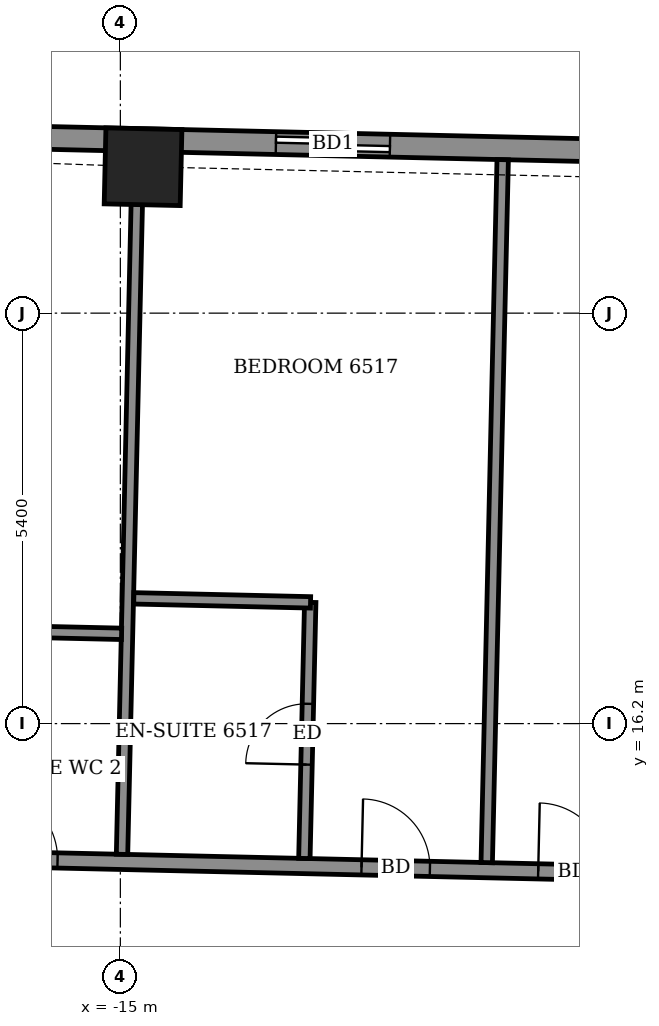
"""IFC4 building model, lengths in metres.
Left out: names, types, materials, properties, quantities, classifications, styles, units other than length and angle.
Written with IfcOpenShell. Run it as: python <this file> out.ifc"""

import sys

from ifc_helpers import new_model, si_unit, direction, frame, frame_2d, origin, origin_2d, place, context, subcontext, project, spatial, rectangle, extrude, element, fill, save


model = new_model("IFC4")
c1 = context("Model", 3, precision=1e-05, world=origin(), true_north=direction((0.0, 1.0)))
c2 = subcontext(c1, "Body", "Model", "MODEL_VIEW")
j1 = project(units=[si_unit("LENGTHUNIT", "METRE"), si_unit("PLANEANGLEUNIT", "RADIAN")], contexts=[c1])
p1 = place(None, origin())
s1 = spatial("IfcSite", under=j1, at=p1, CompositionType="ELEMENT")
p2 = place(p1, origin())
s2 = spatial("IfcBuilding", under=s1, at=p2, CompositionType="ELEMENT")
p3 = place(p2, frame((0.0, 0.0, 257.3)))
s3 = spatial("IfcBuildingStorey", under=s2, at=p3, CompositionType="ELEMENT", Elevation=257.3)
p4 = place(p3, frame((-14.701, 23.526, -0.55), z_axis=(0.0, 0.0, 1.0), x_axis=(-0.999741948423, 0.022716438162, 0.0)))
e1 = element("IfcColumn", 1, at=p4, inside=s3, PredefinedType="COLUMN", context=c2, shape_type="SweptSolid", body=[
    extrude(rectangle(XDim=1.0, YDim=1.0, at=origin_2d()), origin(), (0.0, 0.0, 1.0), 3.6),
])
p5 = place(p3, frame((26.35, 22.945, 0.0), z_axis=(0.0, 0.0, 1.0), x_axis=(-0.999742523712, 0.022691105788, 0.0)))
e2 = element("IfcWall", 2, at=p5, inside=s3, PredefinedType="SOLIDWALL", context=c2, shape_type="SweptSolid", body=[
    extrude(rectangle(XDim=47.771, YDim=0.3, at=frame_2d((23.886, 0.0))), origin(), (0.0, 0.0, 1.0), 2.55),
])
p6 = place(p5, frame((1.578, 0.0, 0.0)))
e3 = element("IfcOpeningElement", 3, at=p6, cuts=e2, PredefinedType="OPENING", context=c2, shape_type="SweptSolid", body=[
    extrude(rectangle(XDim=1.5, YDim=2.4, at=frame_2d((0.75, 1.2))), frame((0.0, 0.16, 0.0), z_axis=(0.0, -1.0, 0.0), x_axis=(1.0, 0.0, 0.0)), (0.0, 0.0, 1.0), 0.32),
])
p7 = place(p5, frame((4.545, 0.0, 0.0)))
e4 = element("IfcOpeningElement", 4, at=p7, cuts=e2, PredefinedType="OPENING", context=c2, shape_type="SweptSolid", body=[
    extrude(rectangle(XDim=1.5, YDim=2.4, at=frame_2d((0.75, 1.2))), frame((0.0, 0.16, 0.0), z_axis=(0.0, -1.0, 0.0), x_axis=(1.0, 0.0, 0.0)), (0.0, 0.0, 1.0), 0.32),
])
p8 = place(p5, frame((10.354, 0.0, 0.0)))
e5 = element("IfcOpeningElement", 5, at=p8, cuts=e2, PredefinedType="OPENING", context=c2, shape_type="SweptSolid", body=[
    extrude(rectangle(XDim=1.5, YDim=2.4, at=frame_2d((0.75, 1.2))), frame((0.0, 0.16, 0.0), z_axis=(0.0, -1.0, 0.0), x_axis=(1.0, 0.0, 0.0)), (0.0, 0.0, 1.0), 0.32),
])
p9 = place(p5, frame((15.204, 0.0, 0.0)))
e6 = element("IfcOpeningElement", 6, at=p9, cuts=e2, PredefinedType="OPENING", context=c2, shape_type="SweptSolid", body=[
    extrude(rectangle(XDim=1.5, YDim=2.4, at=frame_2d((0.75, 1.2))), frame((0.0, 0.16, 0.0), z_axis=(0.0, -1.0, 0.0), x_axis=(1.0, 0.0, 0.0)), (0.0, 0.0, 1.0), 0.32),
])
p10 = place(p5, frame((18.537, 0.0, 0.0)))
e7 = element("IfcOpeningElement", 7, at=p10, cuts=e2, PredefinedType="OPENING", context=c2, shape_type="SweptSolid", body=[
    extrude(rectangle(XDim=1.2, YDim=2.4, at=frame_2d((0.6, 1.2))), frame((0.0, 0.16, 0.0), z_axis=(0.0, -1.0, 0.0), x_axis=(1.0, 0.0, 0.0)), (0.0, 0.0, 1.0), 0.32),
])
p11 = place(p5, frame((24.171, 0.0, 0.0)))
e8 = element("IfcOpeningElement", 8, at=p11, cuts=e2, PredefinedType="OPENING", context=c2, shape_type="SweptSolid", body=[
    extrude(rectangle(XDim=1.5, YDim=2.4, at=frame_2d((0.75, 1.2))), frame((0.0, 0.16, 0.0), z_axis=(0.0, -1.0, 0.0), x_axis=(1.0, 0.0, 0.0)), (0.0, 0.0, 1.0), 0.32),
])
p12 = place(p5, frame((28.871, 0.0, 0.0)))
e9 = element("IfcOpeningElement", 9, at=p12, cuts=e2, PredefinedType="OPENING", context=c2, shape_type="SweptSolid", body=[
    extrude(rectangle(XDim=1.5, YDim=2.4, at=frame_2d((0.75, 1.2))), frame((0.0, 0.16, 0.0), z_axis=(0.0, -1.0, 0.0), x_axis=(1.0, 0.0, 0.0)), (0.0, 0.0, 1.0), 0.32),
])
p13 = place(p5, frame((32.055, 0.0, 0.0)))
e10 = element("IfcOpeningElement", 10, at=p13, cuts=e2, PredefinedType="OPENING", context=c2, shape_type="SweptSolid", body=[
    extrude(rectangle(XDim=1.5, YDim=2.4, at=frame_2d((0.75, 1.2))), frame((0.0, 0.16, 0.0), z_axis=(0.0, -1.0, 0.0), x_axis=(1.0, 0.0, 0.0)), (0.0, 0.0, 1.0), 0.32),
])
p14 = place(p5, frame((37.813, 0.0, 0.0)))
e11 = element("IfcOpeningElement", 11, at=p14, cuts=e2, PredefinedType="OPENING", context=c2, shape_type="SweptSolid", body=[
    extrude(rectangle(XDim=1.5, YDim=2.4, at=frame_2d((0.75, 1.2))), frame((0.0, 0.16, 0.0), z_axis=(0.0, -1.0, 0.0), x_axis=(1.0, 0.0, 0.0)), (0.0, 0.0, 1.0), 0.32),
])
p15 = place(p5, frame((43.052, 0.0, 0.9)))
e12 = element("IfcOpeningElement", 12, at=p15, cuts=e2, PredefinedType="OPENING", context=c2, shape_type="SweptSolid", body=[
    extrude(rectangle(XDim=2.4, YDim=1.5, at=frame_2d((1.2, 0.75))), frame((0.0, 0.16, 0.0), z_axis=(0.0, -1.0, 0.0), x_axis=(1.0, 0.0, 0.0)), (0.0, 0.0, 1.0), 0.32),
])
p16 = place(p3, frame((-24.474, 14.596, 0.0), z_axis=(0.0, 0.0, 1.0), x_axis=(0.999742424031, -0.022695497208, 0.0)))
e13 = element("IfcWall", 13, at=p16, inside=s3, PredefinedType="PARTITIONING", context=c2, shape_type="SweptSolid", body=[
    extrude(rectangle(XDim=52.872, YDim=0.2, at=frame_2d((26.436, 0.0))), origin(), (0.0, 0.0, 1.0), 3.05),
])
p17 = place(p16, frame((51.336, 0.0, 0.0)))
e14 = element("IfcOpeningElement", 14, at=p17, cuts=e13, PredefinedType="OPENING", context=c2, shape_type="SweptSolid", body=[
    extrude(rectangle(XDim=1.0, YDim=2.1, at=frame_2d((0.5, 1.05))), frame((0.0, 0.11, 0.0), z_axis=(0.0, -1.0, 0.0), x_axis=(1.0, 0.0, 0.0)), (0.0, 0.0, 1.0), 0.22),
])
p18 = place(p16, frame((47.25, 0.0, 0.0)))
e15 = element("IfcOpeningElement", 15, at=p18, cuts=e13, PredefinedType="OPENING", context=c2, shape_type="SweptSolid", body=[
    extrude(rectangle(XDim=0.9, YDim=2.1, at=frame_2d((0.45, 1.05))), frame((0.0, 0.11, 0.0), z_axis=(0.0, -1.0, 0.0), x_axis=(1.0, 0.0, 0.0)), (0.0, 0.0, 1.0), 0.22),
])
p19 = place(p16, frame((42.475, 0.0, 0.0)))
e16 = element("IfcOpeningElement", 16, at=p19, cuts=e13, PredefinedType="OPENING", context=c2, shape_type="SweptSolid", body=[
    extrude(rectangle(XDim=0.9, YDim=2.1, at=frame_2d((0.45, 1.05))), frame((0.0, 0.11, 0.0), z_axis=(0.0, -1.0, 0.0), x_axis=(1.0, 0.0, 0.0)), (0.0, 0.0, 1.0), 0.22),
])
p20 = place(p16, frame((40.15, 0.0, 0.0)))
e17 = element("IfcOpeningElement", 17, at=p20, cuts=e13, PredefinedType="OPENING", context=c2, shape_type="SweptSolid", body=[
    extrude(rectangle(XDim=0.9, YDim=2.1, at=frame_2d((0.45, 1.05))), frame((0.0, 0.11, 0.0), z_axis=(0.0, -1.0, 0.0), x_axis=(1.0, 0.0, 0.0)), (0.0, 0.0, 1.0), 0.22),
])
p21 = place(p16, frame((33.15, 0.0, 0.0)))
e18 = element("IfcOpeningElement", 18, at=p21, cuts=e13, PredefinedType="OPENING", context=c2, shape_type="SweptSolid", body=[
    extrude(rectangle(XDim=0.9, YDim=2.1, at=frame_2d((0.45, 1.05))), frame((0.0, 0.11, 0.0), z_axis=(0.0, -1.0, 0.0), x_axis=(1.0, 0.0, 0.0)), (0.0, 0.0, 1.0), 0.22),
])
p22 = place(p16, frame((30.95, 0.0, 0.0)))
e19 = element("IfcOpeningElement", 19, at=p22, cuts=e13, PredefinedType="OPENING", context=c2, shape_type="SweptSolid", body=[
    extrude(rectangle(XDim=0.9, YDim=2.1, at=frame_2d((0.45, 1.05))), frame((0.0, 0.11, 0.0), z_axis=(0.0, -1.0, 0.0), x_axis=(1.0, 0.0, 0.0)), (0.0, 0.0, 1.0), 0.22),
])
p23 = place(p16, frame((23.975, 0.0, 0.0)))
e20 = element("IfcOpeningElement", 20, at=p23, cuts=e13, PredefinedType="OPENING", context=c2, shape_type="SweptSolid", body=[
    extrude(rectangle(XDim=0.9, YDim=2.1, at=frame_2d((0.45, 1.05))), frame((0.0, 0.11, 0.0), z_axis=(0.0, -1.0, 0.0), x_axis=(1.0, 0.0, 0.0)), (0.0, 0.0, 1.0), 0.22),
])
p24 = place(p16, frame((21.925, 0.0, 0.0)))
e21 = element("IfcOpeningElement", 21, at=p24, cuts=e13, PredefinedType="OPENING", context=c2, shape_type="SweptSolid", body=[
    extrude(rectangle(XDim=0.9, YDim=2.1, at=frame_2d((0.45, 1.05))), frame((0.0, 0.11, 0.0), z_axis=(0.0, -1.0, 0.0), x_axis=(1.0, 0.0, 0.0)), (0.0, 0.0, 1.0), 0.22),
])
p25 = place(p16, frame((14.975, 0.0, 0.0)))
e22 = element("IfcOpeningElement", 22, at=p25, cuts=e13, PredefinedType="OPENING", context=c2, shape_type="SweptSolid", body=[
    extrude(rectangle(XDim=0.9, YDim=2.1, at=frame_2d((0.45, 1.05))), frame((0.0, 0.11, 0.0), z_axis=(0.0, -1.0, 0.0), x_axis=(1.0, 0.0, 0.0)), (0.0, 0.0, 1.0), 0.22),
])
p26 = place(p16, frame((12.65, 0.0, 0.0)))
e23 = element("IfcOpeningElement", 23, at=p26, cuts=e13, PredefinedType="OPENING", context=c2, shape_type="SweptSolid", body=[
    extrude(rectangle(XDim=0.9, YDim=2.1, at=frame_2d((0.45, 1.05))), frame((0.0, 0.11, 0.0), z_axis=(0.0, -1.0, 0.0), x_axis=(1.0, 0.0, 0.0)), (0.0, 0.0, 1.0), 0.22),
])
p27 = place(p16, frame((2.0, 0.0, 0.0)))
e24 = element("IfcOpeningElement", 24, at=p27, cuts=e13, PredefinedType="OPENING", context=c2, shape_type="SweptSolid", body=[
    extrude(rectangle(XDim=1.0, YDim=2.1, at=frame_2d((0.5, 1.05))), frame((0.0, 0.11, 0.0), z_axis=(0.0, -1.0, 0.0), x_axis=(1.0, 0.0, 0.0)), (0.0, 0.0, 1.0), 0.22),
])
p28 = place(p16, frame((7.75, 0.0, 0.0)))
e25 = element("IfcOpeningElement", 25, at=p28, cuts=e13, PredefinedType="OPENING", context=c2, shape_type="SweptSolid", body=[
    extrude(rectangle(XDim=0.9, YDim=2.1, at=frame_2d((0.45, 1.05))), frame((0.0, 0.11, 0.0), z_axis=(0.0, -1.0, 0.0), x_axis=(1.0, 0.0, 0.0)), (0.0, 0.0, 1.0), 0.22),
])
p29 = place(p3, frame((-14.978, 14.48, 0.0), z_axis=(0.0, 0.0, 1.0), x_axis=(0.022697424684, 0.999742380272, 0.0)))
e26 = element("IfcWall", 26, at=p29, inside=s3, PredefinedType="PARTITIONING", context=c2, shape_type="SweptSolid", body=[
    extrude(rectangle(XDim=9.25, YDim=0.15, at=frame_2d((4.625, 0.0))), origin(), (0.0, 0.0, 1.0), 3.05),
])
p30 = place(p3, frame((-12.579, 14.426, 0.0), z_axis=(0.0, 0.0, 1.0), x_axis=(0.022894207861, 0.999737893273, 0.0)))
e27 = element("IfcWall", 27, at=p30, inside=s3, PredefinedType="PARTITIONING", context=c2, shape_type="SweptSolid", body=[
    extrude(rectangle(XDim=3.37, YDim=0.15, at=frame_2d((1.685, 0.0))), origin(), (0.0, 0.0, 1.0), 3.05),
])
p31 = place(p30, frame((1.235, 0.0, 0.0)))
e28 = element("IfcOpeningElement", 28, at=p31, cuts=e27, PredefinedType="OPENING", context=c2, shape_type="SweptSolid", body=[
    extrude(rectangle(XDim=0.8, YDim=2.1, at=frame_2d((0.4, 1.05))), frame((0.0, 0.085, 0.0), z_axis=(0.0, -1.0, 0.0), x_axis=(1.0, 0.0, 0.0)), (0.0, 0.0, 1.0), 0.17),
])
p32 = place(p3, frame((-10.18, 14.371, 0.0), z_axis=(0.0, 0.0, 1.0), x_axis=(0.022698023584, 0.999742366675, 0.0)))
e29 = element("IfcWall", 29, at=p32, inside=s3, PredefinedType="PARTITIONING", context=c2, shape_type="SweptSolid", body=[
    extrude(rectangle(XDim=9.25, YDim=0.15, at=frame_2d((4.625, 0.0))), origin(), (0.0, 0.0, 1.0), 2.55),
])
p33 = place(p3, frame((-17.508, 17.438, 0.0), z_axis=(0.0, 0.0, 1.0), x_axis=(0.999746160391, -0.022530308093, 0.0)))
e30 = element("IfcWall", 30, at=p33, inside=s3, PredefinedType="PARTITIONING", context=c2, shape_type="SweptSolid", body=[
    extrude(rectangle(XDim=2.525, YDim=0.15, at=frame_2d((1.262, 0.0))), origin(), (0.0, 0.0, 1.0), 3.05),
])
p34 = place(p3, frame((-14.823, 17.848, 0.0), z_axis=(0.0, 0.0, 1.0), x_axis=(0.999740478815, -0.022781023197, 0.0)))
e31 = element("IfcWall", 31, at=p34, inside=s3, PredefinedType="PARTITIONING", context=c2, shape_type="SweptSolid", body=[
    extrude(rectangle(XDim=2.325, YDim=0.15, at=frame_2d((1.163, 0.0))), origin(), (0.0, 0.0, 1.0), 3.05),
])
p35 = place(p14, origin())
e32 = element("IfcDoor", 32, at=p35, inside=s3, OperationType="SLIDING_TO_LEFT", PredefinedType="DOOR", context=c2, shape_type="SweptSolid", body=[
    extrude(rectangle(XDim=1.5, YDim=2.4, at=frame_2d((0.75, 1.2))), frame((0.0, 0.025, 0.0), z_axis=(0.0, -1.0, 0.0), x_axis=(1.0, 0.0, 0.0)), (0.0, 0.0, 1.0), 0.05),
])
fill(e11, e32)
p36 = place(p25, origin())
e33 = element("IfcDoor", 33, at=p36, inside=s3, OperationType="SINGLE_SWING_RIGHT", PredefinedType="DOOR", context=c2, shape_type="SweptSolid", body=[
    extrude(rectangle(XDim=0.9, YDim=2.1, at=frame_2d((0.45, 1.05))), frame((0.0, 0.025, 0.0), z_axis=(0.0, -1.0, 0.0), x_axis=(1.0, 0.0, 0.0)), (0.0, 0.0, 1.0), 0.05),
])
fill(e22, e33)
p37 = place(p26, origin())
e34 = element("IfcDoor", 34, at=p37, inside=s3, OperationType="SINGLE_SWING_LEFT", PredefinedType="DOOR", context=c2, shape_type="SweptSolid", body=[
    extrude(rectangle(XDim=0.9, YDim=2.1, at=frame_2d((0.45, 1.05))), frame((0.0, 0.025, 0.0), z_axis=(0.0, -1.0, 0.0), x_axis=(1.0, 0.0, 0.0)), (0.0, 0.0, 1.0), 0.05),
])
fill(e23, e34)
p38 = place(p31, origin())
e35 = element("IfcDoor", 35, at=p38, inside=s3, OperationType="SINGLE_SWING_LEFT", PredefinedType="DOOR", context=c2, shape_type="SweptSolid", body=[
    extrude(rectangle(XDim=0.8, YDim=2.1, at=frame_2d((0.4, 1.05))), frame((0.0, 0.025, 0.0), z_axis=(0.0, -1.0, 0.0), x_axis=(1.0, 0.0, 0.0)), (0.0, 0.0, 1.0), 0.05),
])
fill(e28, e35)
p39 = place(p28, origin())
e36 = element("IfcDoor", 36, at=p39, inside=s3, OperationType="SINGLE_SWING_RIGHT", PredefinedType="DOOR", context=c2, shape_type="SweptSolid", body=[
    extrude(rectangle(XDim=0.9, YDim=2.1, at=frame_2d((0.45, 1.05))), frame((0.0, 0.025, 0.0), z_axis=(0.0, -1.0, 0.0), x_axis=(1.0, 0.0, 0.0)), (0.0, 0.0, 1.0), 0.05),
])
fill(e25, e36)
save(model, sys.argv[1])
